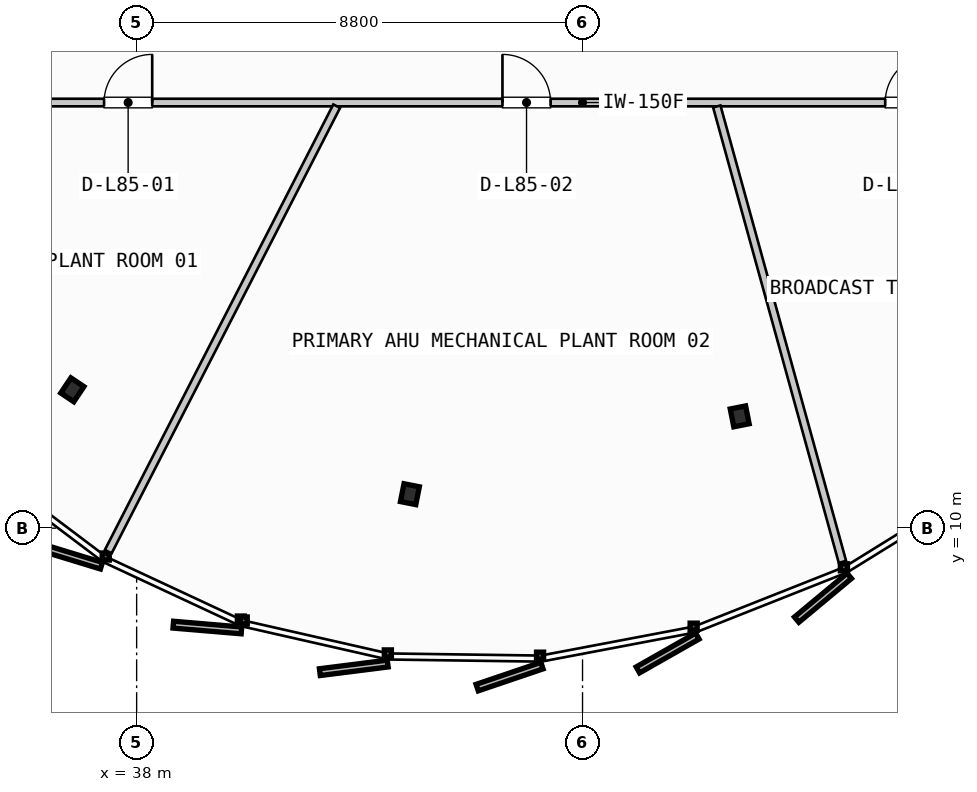
"""IFC4 building model, lengths in metres.
Left out: names, types, materials, properties, quantities, classifications, styles, units other than length and angle.
Written with IfcOpenShell. Run it as: python <this file> out.ifc"""

import sys

from ifc_helpers import new_model, si_unit, direction, frame, frame_2d, origin, origin_2d, place, context, subcontext, project, spatial, rectangle, i_section, extrude, source, transform, mapped, element, fill, save


model = new_model("IFC4")
c1 = context("Model", 3, precision=1e-05, world=origin(), true_north=direction((0.0, 1.0)))
c2 = subcontext(c1, "Body", "Model", "MODEL_VIEW")
j1 = project(units=[si_unit("LENGTHUNIT", "METRE"), si_unit("PLANEANGLEUNIT", "RADIAN")], contexts=[c1])
p1 = place(None, origin())
s1 = spatial("IfcSite", under=j1, at=p1, CompositionType="ELEMENT")
p2 = place(p1, origin())
s2 = spatial("IfcBuilding", under=s1, at=p2, CompositionType="ELEMENT")
p3 = place(p2, frame((0.0, 0.0, 320.3)))
s3 = spatial("IfcBuildingStorey", under=s2, at=p3, CompositionType="ELEMENT", Elevation=320.3)
m1 = source(origin(), c2, "Body", "SweptSolid", [
    extrude(i_section(OverallWidth=0.309, OverallDepth=0.359, WebThickness=0.016, FlangeThickness=0.026, FilletRadius=0.027, at=origin_2d()), origin(), (0.0, 0.0, 1.0), 3.735),
])
for number, where, z_axis, x_axis in (
    (1, (36.731, 12.731, 0.0), (0.0, 0.0, 1.0), (-0.556, -0.831, 0.0)),
    (2, (43.393, 10.671, 0.0), (0.0, 0.0, 1.0), (-0.195, -0.981, 0.0)),
    (3, (49.902, 12.207, 0.0), (0.0, 0.0, 1.0), (0.195, -0.981, 0.0)),
):
    element("IfcColumn", number, at=place(p3, frame(where, z_axis=z_axis, x_axis=x_axis)), inside=s3, PredefinedType="COLUMN", context=c2, shape_type="MappedRepresentation", body=[
        mapped(m1, transform((0.0, 0.0, 0.0), scale=1.0)),
    ])
p4 = place(p3, frame((33.1, 18.4, 0.0), z_axis=(0.0, 0.0, 1.0), x_axis=(1.0, 0.0, 0.0)))
e4 = element("IfcWall", 4, at=p4, inside=s3, PredefinedType="PARTITIONING", context=c2, shape_type="SweptSolid", body=[
    extrude(rectangle(XDim=27.4, YDim=0.15, at=frame_2d((13.7, 0.0))), origin(), (0.0, 0.0, 1.0), 3.26),
])
p5 = place(p4, frame((4.257, 0.0, 0.0)))
e5 = element("IfcOpeningElement", 5, at=p5, cuts=e4, PredefinedType="OPENING", context=c2, shape_type="SweptSolid", body=[
    extrude(rectangle(XDim=0.95, YDim=2.15, at=frame_2d((0.475, 1.075))), frame((0.0, 0.085, 0.0), z_axis=(0.0, -1.0, 0.0), x_axis=(1.0, 0.0, 0.0)), (0.0, 0.0, 1.0), 0.17),
])
p6 = place(p4, frame((12.12, 0.0, 0.0)))
e6 = element("IfcOpeningElement", 6, at=p6, cuts=e4, PredefinedType="OPENING", context=c2, shape_type="SweptSolid", body=[
    extrude(rectangle(XDim=0.95, YDim=2.15, at=frame_2d((0.475, 1.075))), frame((0.0, 0.085, 0.0), z_axis=(0.0, -1.0, 0.0), x_axis=(1.0, 0.0, 0.0)), (0.0, 0.0, 1.0), 0.17),
])
p7 = place(p4, frame((19.674, 0.0, 0.0)))
e7 = element("IfcOpeningElement", 7, at=p7, cuts=e4, PredefinedType="OPENING", context=c2, shape_type="SweptSolid", body=[
    extrude(rectangle(XDim=0.95, YDim=2.15, at=frame_2d((0.475, 1.075))), frame((0.0, 0.085, 0.0), z_axis=(0.0, -1.0, 0.0), x_axis=(1.0, 0.0, 0.0)), (0.0, 0.0, 1.0), 0.17),
])
p8 = place(p3, frame((41.948, 18.329, 0.0), z_axis=(0.0, 0.0, 1.0), x_axis=(-0.45632417338, -0.889813603396, 0.0)))
e8 = element("IfcWall", 8, at=p8, inside=s3, PredefinedType="PARTITIONING", context=c2, shape_type="SweptSolid", body=[
    extrude(rectangle(XDim=9.879, YDim=0.15, at=frame_2d((4.939, 0.0))), origin(), (0.0, 0.0, 1.0), 3.26),
])
p9 = place(p3, frame((49.45, 18.323, 0.0), z_axis=(0.0, 0.0, 1.0), x_axis=(0.265908021181, -0.963998404704, 0.0)))
e9 = element("IfcWall", 9, at=p9, inside=s3, PredefinedType="PARTITIONING", context=c2, shape_type="SweptSolid", body=[
    extrude(rectangle(XDim=9.324, YDim=0.15, at=frame_2d((4.662, 0.0))), origin(), (0.0, 0.0, 1.0), 3.26),
])
m2 = source(origin(), c2, "Body", "SweptSolid", [
    extrude(rectangle(XDim=0.95, YDim=2.15, at=frame_2d((0.475, 1.075))), frame((0.0, 0.025, 0.0), z_axis=(0.0, -1.0, 0.0), x_axis=(1.0, 0.0, 0.0)), (0.0, 0.0, 1.0), 0.05),
])
p10 = place(p5, origin())
e10 = element("IfcDoor", 10, at=p10, inside=s3, OperationType="SINGLE_SWING_RIGHT", PredefinedType="DOOR", context=c2, shape_type="MappedRepresentation", body=[
    mapped(m2, transform((0.0, 0.0, 0.0), scale=1.0)),
])
fill(e5, e10)
p11 = place(p6, origin())
e11 = element("IfcDoor", 11, at=p11, inside=s3, OperationType="SINGLE_SWING_LEFT", PredefinedType="DOOR", context=c2, shape_type="MappedRepresentation", body=[
    mapped(m2, transform((0.0, 0.0, 0.0), scale=1.0)),
])
fill(e6, e11)
p12 = place(p7, origin())
e12 = element("IfcDoor", 12, at=p12, inside=s3, OperationType="SINGLE_SWING_RIGHT", PredefinedType="DOOR", context=c2, shape_type="MappedRepresentation", body=[
    mapped(m2, transform((0.0, 0.0, 0.0), scale=1.0)),
])
fill(e7, e12)
save(model, sys.argv[1])
